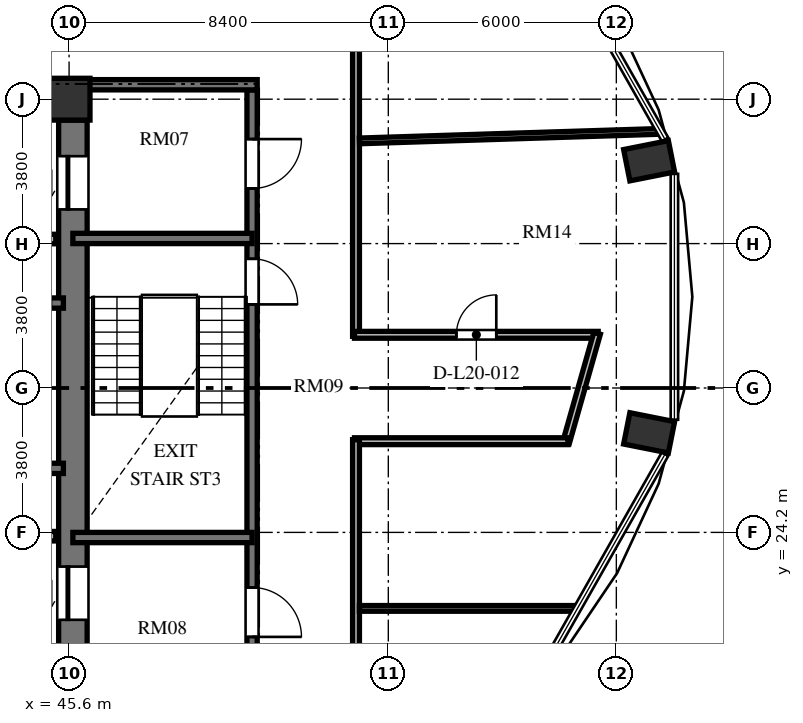
"""IFC4 building model, lengths in metres.
Left out: names, types, materials, properties, quantities, classifications, styles, units other than length and angle.
Written with IfcOpenShell. Run it as: python <this file> out.ifc"""

import sys

from ifc_helpers import new_model, si_unit, direction, frame, frame_2d, origin, origin_2d, place, context, subcontext, project, spatial, rectangle, extrude, element, fill, save


model = new_model("IFC4")
c1 = context("Model", 3, precision=1e-05, world=origin(), true_north=direction((0.0, 1.0)))
c2 = subcontext(c1, "Body", "Model", "MODEL_VIEW")
j1 = project(units=[si_unit("LENGTHUNIT", "METRE"), si_unit("PLANEANGLEUNIT", "RADIAN")], contexts=[c1])
p1 = place(None, origin())
s1 = spatial("IfcSite", under=j1, at=p1, CompositionType="ELEMENT")
p2 = place(p1, origin())
s2 = spatial("IfcBuilding", under=s1, at=p2, CompositionType="ELEMENT")
p3 = place(p2, frame((0.0, 0.0, 81.744)))
s3 = spatial("IfcBuildingStorey", under=s2, at=p3, CompositionType="ELEMENT", Elevation=81.744)
for number, where, z_axis, x_axis in (
    (1, (60.863, 26.82, 0.0), (0.0, 0.0, 1.0), (0.981, -0.195, 0.0)),
    (2, (60.863, 33.98, 0.0), (0.0, 0.0, 1.0), (0.981, 0.195, 0.0)),
):
    element("IfcColumn", number, at=place(p3, frame(where, z_axis=z_axis, x_axis=x_axis)), inside=s3, PredefinedType="COLUMN", context=c2, shape_type="SweptSolid", body=[
        extrude(rectangle(XDim=1.2, YDim=0.84, at=origin_2d()), origin(), (0.0, 0.0, 1.0), 3.648),
    ])
p4 = place(p3, frame((45.6, 35.6, 0.0), z_axis=(0.0, 0.0, 1.0), x_axis=(1.0, 0.0, 0.0)))
e3 = element("IfcColumn", 3, at=p4, inside=s3, PredefinedType="COLUMN", context=c2, shape_type="SweptSolid", body=[
    extrude(rectangle(XDim=1.1, YDim=1.1, at=origin_2d()), origin(), (0.0, 0.0, 1.0), 3.648),
])
p5 = place(p3, frame((45.7, 20.95, 0.0), z_axis=(0.0, 0.0, 1.0), x_axis=(0.0, 1.0, 0.0)))
e4 = element("IfcWall", 4, at=p5, inside=s3, PredefinedType="SHEAR", context=c2, shape_type="SweptSolid", body=[
    extrude(rectangle(XDim=14.1, YDim=0.75, at=frame_2d((7.05, 0.0))), origin(), (0.0, 0.0, 1.0), 3.648),
])
p6 = place(p5, frame((11.75, 0.0, 0.0)))
e5 = element("IfcOpeningElement", 5, at=p6, cuts=e4, PredefinedType="OPENING", context=c2, shape_type="SweptSolid", body=[
    extrude(rectangle(XDim=1.4, YDim=2.3, at=frame_2d((0.7, 1.15))), frame((0.0, 0.385, 0.0), z_axis=(0.0, -1.0, 0.0), x_axis=(1.0, 0.0, 0.0)), (0.0, 0.0, 1.0), 0.77),
])
p7 = place(p5, frame((0.95, 0.0, 0.0)))
e6 = element("IfcOpeningElement", 6, at=p7, cuts=e4, PredefinedType="OPENING", context=c2, shape_type="SweptSolid", body=[
    extrude(rectangle(XDim=1.4, YDim=2.3, at=frame_2d((0.7, 1.15))), frame((0.0, 0.385, 0.0), z_axis=(0.0, -1.0, 0.0), x_axis=(1.0, 0.0, 0.0)), (0.0, 0.0, 1.0), 0.77),
])
p8 = place(p3, frame((37.465, 30.235, 0.0), z_axis=(0.0, 0.0, 1.0), x_axis=(1.0, 0.0, 0.0)))
e7 = element("IfcWall", 7, at=p8, inside=s3, PredefinedType="SHEAR", context=c2, shape_type="SweptSolid", body=[
    extrude(rectangle(XDim=7.985, YDim=0.27, at=frame_2d((3.992, 0.0))), origin(), (0.0, 0.0, 1.0), 3.648),
])
p9 = place(p8, frame((6.455, 0.0, 0.0)))
e8 = element("IfcOpeningElement", 8, at=p9, cuts=e7, PredefinedType="OPENING", context=c2, shape_type="SweptSolid", body=[
    extrude(rectangle(XDim=1.2, YDim=2.15, at=frame_2d((0.6, 1.075))), frame((0.0, 0.145, 0.0), z_axis=(0.0, -1.0, 0.0), x_axis=(1.0, 0.0, 0.0)), (0.0, 0.0, 1.0), 0.29),
])
p10 = place(p3, frame((37.465, 25.885, 0.0), z_axis=(0.0, 0.0, 1.0), x_axis=(1.0, 0.0, 0.0)))
e9 = element("IfcWall", 9, at=p10, inside=s3, PredefinedType="SHEAR", context=c2, shape_type="SweptSolid", body=[
    extrude(rectangle(XDim=7.985, YDim=0.27, at=frame_2d((3.992, 0.0))), origin(), (0.0, 0.0, 1.0), 3.648),
])
for number, where, z_axis, x_axis in (
    (10, (42.95, 31.92, 0.0), (0.0, 0.0, 1.0), (1.0, 0.0, 0.0)),
    (11, (42.95, 24.1, 0.0), (0.0, 0.0, 1.0), (1.0, 0.0, 0.0)),
):
    element("IfcWall", number, at=place(p3, frame(where, z_axis=z_axis, x_axis=x_axis)), inside=s3, PredefinedType="SOLIDWALL", context=c2, shape_type="SweptSolid", body=[
        extrude(rectangle(XDim=2.3, YDim=0.25, at=frame_2d((1.15, 0.0))), origin(), (0.0, 0.0, 1.0), 3.428),
    ])
p11 = place(p3, frame((50.415, 35.845, 0.0), z_axis=(0.0, 0.0, 1.0), x_axis=(0.0, -1.0, 0.0)))
e12 = element("IfcWall", 12, at=p11, inside=s3, PredefinedType="SHEAR", context=c2, shape_type="SweptSolid", body=[
    extrude(rectangle(XDim=15.825, YDim=0.27, at=frame_2d((7.913, 0.0))), origin(), (0.0, 0.0, 1.0), 3.648),
])
p12 = place(p11, frame((4.445, 0.0, 0.0)))
e13 = element("IfcOpeningElement", 13, at=p12, cuts=e12, PredefinedType="OPENING", context=c2, shape_type="SweptSolid", body=[
    extrude(rectangle(XDim=1.2, YDim=2.15, at=frame_2d((0.6, 1.075))), frame((0.0, 0.145, 0.0), z_axis=(0.0, -1.0, 0.0), x_axis=(1.0, 0.0, 0.0)), (0.0, 0.0, 1.0), 0.29),
])
p13 = place(p11, frame((1.295, 0.0, 0.0)))
e14 = element("IfcOpeningElement", 14, at=p13, cuts=e12, PredefinedType="OPENING", context=c2, shape_type="SweptSolid", body=[
    extrude(rectangle(XDim=1.3, YDim=2.2, at=frame_2d((0.65, 1.1))), frame((0.0, 0.145, 0.0), z_axis=(0.0, -1.0, 0.0), x_axis=(1.0, 0.0, 0.0)), (0.0, 0.0, 1.0), 0.29),
])
p14 = place(p11, frame((13.095, 0.0, 0.0)))
e15 = element("IfcOpeningElement", 15, at=p14, cuts=e12, PredefinedType="OPENING", context=c2, shape_type="SweptSolid", body=[
    extrude(rectangle(XDim=1.3, YDim=2.2, at=frame_2d((0.65, 1.1))), frame((0.0, 0.145, 0.0), z_axis=(0.0, -1.0, 0.0), x_axis=(1.0, 0.0, 0.0)), (0.0, 0.0, 1.0), 0.29),
])
p15 = place(p3, frame((46.075, 35.98, 0.0), z_axis=(0.0, 0.0, 1.0), x_axis=(1.0, 0.0, 0.0)))
e16 = element("IfcWall", 16, at=p15, inside=s3, PredefinedType="SHEAR", context=c2, shape_type="SweptSolid", body=[
    extrude(rectangle(XDim=4.475, YDim=0.27, at=frame_2d((2.238, 0.0))), origin(), (0.0, 0.0, 1.0), 3.648),
])
for number, where, z_axis, x_axis in (
    (17, (45.7, 31.935, 0.0), (0.0, 0.0, 1.0), (1.0, 0.0, 0.0)),
    (18, (45.7, 24.065, 0.0), (0.0, 0.0, 1.0), (1.0, 0.0, 0.0)),
):
    element("IfcWall", number, at=place(p3, frame(where, z_axis=z_axis, x_axis=x_axis)), inside=s3, PredefinedType="SHEAR", context=c2, shape_type="SweptSolid", body=[
        extrude(rectangle(XDim=4.715, YDim=0.27, at=frame_2d((2.357, 0.0))), origin(), (0.0, 0.0, 1.0), 3.648),
    ])
p16 = place(p3, frame((53.15, 38.79, 0.0), z_axis=(0.0, 0.0, 1.0), x_axis=(0.0, -1.0, 0.0)))
e19 = element("IfcWall", 19, at=p16, inside=s3, PredefinedType="PARTITIONING", context=c2, shape_type="SweptSolid", body=[
    extrude(rectangle(XDim=9.43, YDim=0.18, at=frame_2d((4.715, 0.0))), origin(), (0.0, 0.0, 1.0), 3.428),
])
p17 = place(p3, frame((53.11, 29.4, 0.0), z_axis=(0.0, 0.0, 1.0), x_axis=(1.0, 0.0, 0.0)))
e20 = element("IfcWall", 20, at=p17, inside=s3, PredefinedType="PARTITIONING", context=c2, shape_type="SweptSolid", body=[
    extrude(rectangle(XDim=6.413, YDim=0.18, at=frame_2d((3.206, 0.0))), origin(), (0.0, 0.0, 1.0), 3.428),
])
p18 = place(p17, frame((2.681, 0.0, 0.0)))
e21 = element("IfcOpeningElement", 21, at=p18, cuts=e20, PredefinedType="OPENING", context=c2, shape_type="SweptSolid", body=[
    extrude(rectangle(XDim=1.05, YDim=2.15, at=frame_2d((0.525, 1.075))), frame((0.0, 0.1, 0.0), z_axis=(0.0, -1.0, 0.0), x_axis=(1.0, 0.0, 0.0)), (0.0, 0.0, 1.0), 0.2),
])
p19 = place(p3, frame((59.494, 29.438, 0.0), z_axis=(0.0, 0.0, 1.0), x_axis=(-0.273222154729, -0.961950962453, 0.0)))
e22 = element("IfcWall", 22, at=p19, inside=s3, PredefinedType="PARTITIONING", context=c2, shape_type="SweptSolid", body=[
    extrude(rectangle(XDim=2.991, YDim=0.18, at=frame_2d((1.495, 0.0))), origin(), (0.0, 0.0, 1.0), 3.428),
])
p20 = place(p3, frame((58.727, 26.6, 0.0), z_axis=(0.0, 0.0, 1.0), x_axis=(-1.0, 0.0, 0.0)))
e23 = element("IfcWall", 23, at=p20, inside=s3, PredefinedType="PARTITIONING", context=c2, shape_type="SweptSolid", body=[
    extrude(rectangle(XDim=5.617, YDim=0.18, at=frame_2d((2.809, 0.0))), origin(), (0.0, 0.0, 1.0), 3.428),
])
p21 = place(p3, frame((53.15, 26.64, 0.0), z_axis=(0.0, 0.0, 1.0), x_axis=(0.0, -1.0, 0.0)))
e24 = element("IfcWall", 24, at=p21, inside=s3, PredefinedType="PARTITIONING", context=c2, shape_type="SweptSolid", body=[
    extrude(rectangle(XDim=6.66, YDim=0.18, at=frame_2d((3.33, 0.0))), origin(), (0.0, 0.0, 1.0), 3.428),
])
p22 = place(p3, frame((53.24, 22.2, 0.0), z_axis=(0.0, 0.0, 1.0), x_axis=(1.0, 0.0, 0.0)))
e25 = element("IfcWall", 25, at=p22, inside=s3, PredefinedType="PARTITIONING", context=c2, shape_type="SweptSolid", body=[
    extrude(rectangle(XDim=5.731, YDim=0.15, at=frame_2d((2.866, 0.0))), origin(), (0.0, 0.0, 1.0), 3.428),
])
p23 = place(p3, frame((53.24, 34.502, 0.0), z_axis=(0.0, 0.0, 1.0), x_axis=(0.999499445349, 0.031636351679, 0.0)))
e26 = element("IfcWall", 26, at=p23, inside=s3, PredefinedType="PARTITIONING", context=c2, shape_type="SweptSolid", body=[
    extrude(rectangle(XDim=7.933, YDim=0.15, at=frame_2d((3.967, 0.0))), origin(), (0.0, 0.0, 1.0), 2.813),
])
p24 = place(p6, origin())
e27 = element("IfcDoor", 27, at=p24, inside=s3, OperationType="SLIDING_TO_LEFT", PredefinedType="DOOR", context=c2, shape_type="SweptSolid", body=[
    extrude(rectangle(XDim=1.4, YDim=2.3, at=frame_2d((0.7, 1.15))), frame((0.0, 0.025, 0.0), z_axis=(0.0, -1.0, 0.0), x_axis=(1.0, 0.0, 0.0)), (0.0, 0.0, 1.0), 0.05),
])
fill(e5, e27)
p25 = place(p7, origin())
e28 = element("IfcDoor", 28, at=p25, inside=s3, OperationType="SLIDING_TO_LEFT", PredefinedType="DOOR", context=c2, shape_type="SweptSolid", body=[
    extrude(rectangle(XDim=1.4, YDim=2.3, at=frame_2d((0.7, 1.15))), frame((0.0, 0.025, 0.0), z_axis=(0.0, -1.0, 0.0), x_axis=(1.0, 0.0, 0.0)), (0.0, 0.0, 1.0), 0.05),
])
fill(e6, e28)
p26 = place(p12, origin())
e29 = element("IfcDoor", 29, at=p26, inside=s3, OperationType="SINGLE_SWING_RIGHT", PredefinedType="DOOR", context=c2, shape_type="SweptSolid", body=[
    extrude(rectangle(XDim=1.2, YDim=2.15, at=frame_2d((0.6, 1.075))), frame((0.0, 0.025, 0.0), z_axis=(0.0, -1.0, 0.0), x_axis=(1.0, 0.0, 0.0)), (0.0, 0.0, 1.0), 0.05),
])
fill(e13, e29)
p27 = place(p13, origin())
e30 = element("IfcDoor", 30, at=p27, inside=s3, OperationType="SINGLE_SWING_LEFT", PredefinedType="DOOR", context=c2, shape_type="SweptSolid", body=[
    extrude(rectangle(XDim=1.3, YDim=2.2, at=frame_2d((0.65, 1.1))), frame((0.0, 0.025, 0.0), z_axis=(0.0, -1.0, 0.0), x_axis=(1.0, 0.0, 0.0)), (0.0, 0.0, 1.0), 0.05),
])
fill(e14, e30)
p28 = place(p14, origin())
e31 = element("IfcDoor", 31, at=p28, inside=s3, OperationType="SINGLE_SWING_RIGHT", PredefinedType="DOOR", context=c2, shape_type="SweptSolid", body=[
    extrude(rectangle(XDim=1.3, YDim=2.2, at=frame_2d((0.65, 1.1))), frame((0.0, 0.025, 0.0), z_axis=(0.0, -1.0, 0.0), x_axis=(1.0, 0.0, 0.0)), (0.0, 0.0, 1.0), 0.05),
])
fill(e15, e31)
p29 = place(p18, origin())
e32 = element("IfcDoor", 32, at=p29, inside=s3, OperationType="SINGLE_SWING_RIGHT", PredefinedType="DOOR", context=c2, shape_type="SweptSolid", body=[
    extrude(rectangle(XDim=1.05, YDim=2.15, at=frame_2d((0.525, 1.075))), frame((0.0, 0.025, 0.0), z_axis=(0.0, -1.0, 0.0), x_axis=(1.0, 0.0, 0.0)), (0.0, 0.0, 1.0), 0.05),
])
fill(e21, e32)
save(model, sys.argv[1])
